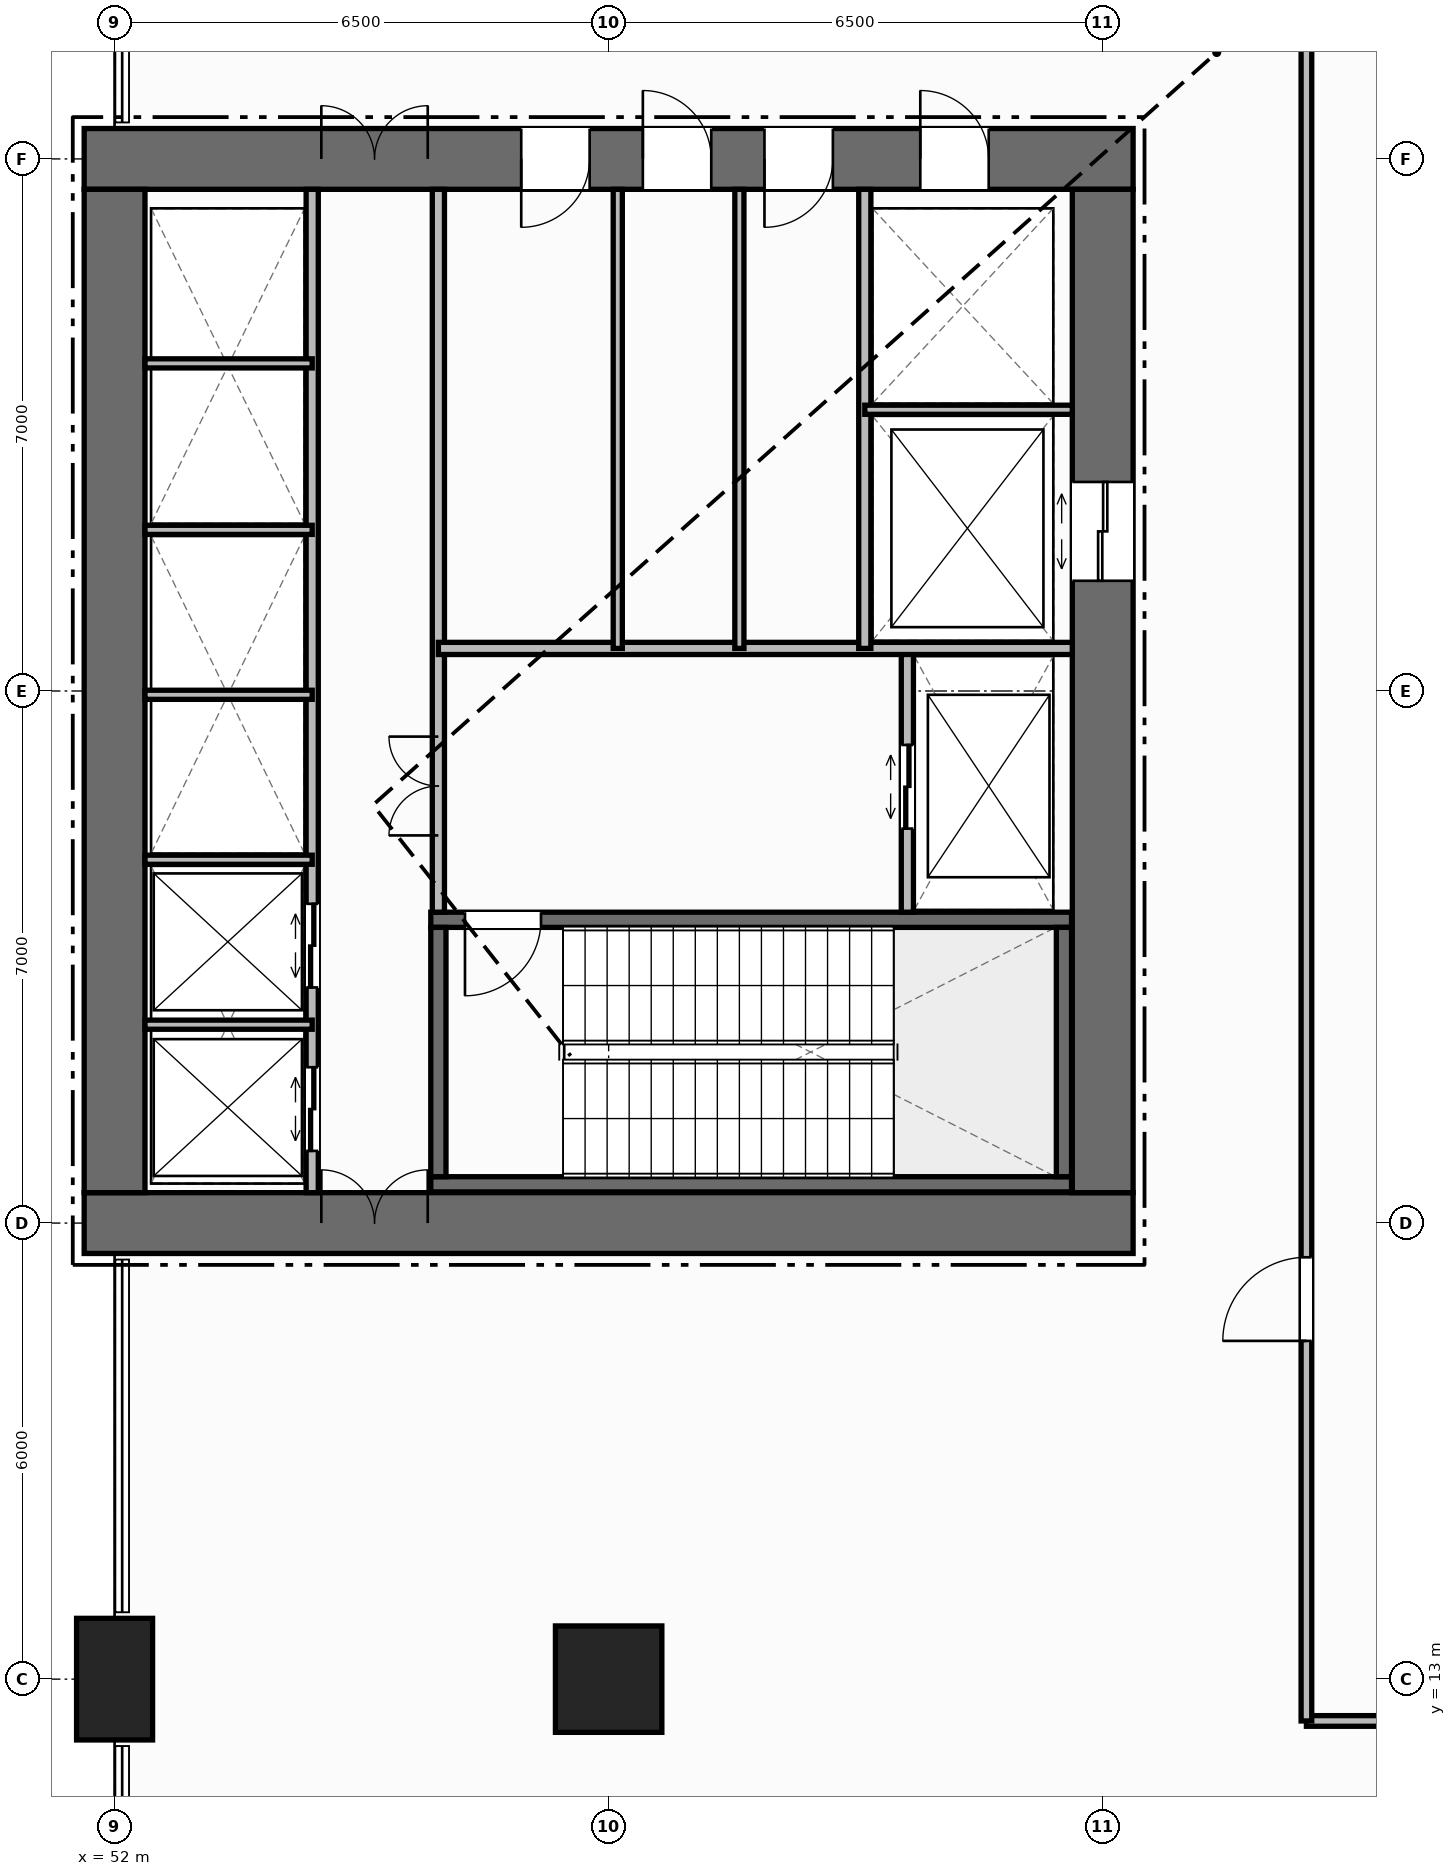
"""IFC4 building model, lengths in metres.
Left out: names, types, materials, properties, quantities, classifications, styles, units other than length and angle.
Written with IfcOpenShell. Run it as: python <this file> out.ifc"""

import sys

from ifc_helpers import new_model, si_unit, direction, frame, frame_2d, origin, origin_2d, place, context, subcontext, project, spatial, rectangle, extrude, element, fill, save


model = new_model("IFC4")
c1 = context("Model", 3, precision=1e-05, world=origin(), true_north=direction((0.0, 1.0)))
c2 = subcontext(c1, "Body", "Model", "MODEL_VIEW")
j1 = project(units=[si_unit("LENGTHUNIT", "METRE"), si_unit("PLANEANGLEUNIT", "RADIAN")], contexts=[c1])
p1 = place(None, origin())
s1 = spatial("IfcSite", under=j1, at=p1, CompositionType="ELEMENT")
p2 = place(p1, origin())
s2 = spatial("IfcBuilding", under=s1, at=p2, CompositionType="ELEMENT")
p3 = place(p2, frame((0.0, 0.0, 11.5)))
s3 = spatial("IfcBuildingStorey", under=s2, at=p3, CompositionType="ELEMENT", Elevation=11.5)
p4 = place(p3, frame((51.6, 19.0, 0.0), z_axis=(0.0, 0.0, 1.0), x_axis=(1.0, 0.0, 0.0)))
e1 = element("IfcWall", 1, at=p4, inside=s3, PredefinedType="SHEAR", context=c2, shape_type="SweptSolid", body=[
    extrude(rectangle(XDim=13.8, YDim=0.8, at=frame_2d((6.9, 0.0))), origin(), (0.0, 0.0, 1.0), 5.5),
])
p5 = place(p4, frame((3.12, 0.0, 0.0)))
e2 = element("IfcOpeningElement", 2, at=p5, cuts=e1, PredefinedType="OPENING", context=c2, shape_type="SweptSolid", body=[
    extrude(rectangle(XDim=1.4, YDim=2.2, at=frame_2d((0.7, 1.1))), frame((0.0, 0.41, 0.0), z_axis=(0.0, -1.0, 0.0), x_axis=(1.0, 0.0, 0.0)), (0.0, 0.0, 1.0), 0.82),
])
p6 = place(p3, frame((51.6, 33.0, 0.0), z_axis=(0.0, 0.0, 1.0), x_axis=(1.0, 0.0, 0.0)))
e3 = element("IfcWall", 3, at=p6, inside=s3, PredefinedType="SHEAR", context=c2, shape_type="SweptSolid", body=[
    extrude(rectangle(XDim=13.8, YDim=0.8, at=frame_2d((6.9, 0.0))), origin(), (0.0, 0.0, 1.0), 5.5),
])
p7 = place(p6, frame((3.12, 0.0, 0.0)))
e4 = element("IfcOpeningElement", 4, at=p7, cuts=e3, PredefinedType="OPENING", context=c2, shape_type="SweptSolid", body=[
    extrude(rectangle(XDim=1.4, YDim=2.2, at=frame_2d((0.7, 1.1))), frame((0.0, 0.41, 0.0), z_axis=(0.0, -1.0, 0.0), x_axis=(1.0, 0.0, 0.0)), (0.0, 0.0, 1.0), 0.82),
])
p8 = place(p6, frame((11.0, 0.0, 0.0)))
e5 = element("IfcOpeningElement", 5, at=p8, cuts=e3, PredefinedType="OPENING", context=c2, shape_type="SweptSolid", body=[
    extrude(rectangle(XDim=0.9, YDim=2.15, at=frame_2d((0.45, 1.075))), frame((0.0, 0.41, 0.0), z_axis=(0.0, -1.0, 0.0), x_axis=(1.0, 0.0, 0.0)), (0.0, 0.0, 1.0), 0.82),
])
p9 = place(p6, frame((5.75, 0.0, 0.0)))
e6 = element("IfcOpeningElement", 6, at=p9, cuts=e3, PredefinedType="OPENING", context=c2, shape_type="SweptSolid", body=[
    extrude(rectangle(XDim=0.9, YDim=2.15, at=frame_2d((0.45, 1.075))), frame((0.0, 0.41, 0.0), z_axis=(0.0, -1.0, 0.0), x_axis=(1.0, 0.0, 0.0)), (0.0, 0.0, 1.0), 0.82),
])
p10 = place(p6, frame((7.35, 0.0, 0.0)))
e7 = element("IfcOpeningElement", 7, at=p10, cuts=e3, PredefinedType="OPENING", context=c2, shape_type="SweptSolid", body=[
    extrude(rectangle(XDim=0.9, YDim=2.15, at=frame_2d((0.45, 1.075))), frame((0.0, 0.41, 0.0), z_axis=(0.0, -1.0, 0.0), x_axis=(1.0, 0.0, 0.0)), (0.0, 0.0, 1.0), 0.82),
])
p11 = place(p6, frame((8.95, 0.0, 0.0)))
e8 = element("IfcOpeningElement", 8, at=p11, cuts=e3, PredefinedType="OPENING", context=c2, shape_type="SweptSolid", body=[
    extrude(rectangle(XDim=0.9, YDim=2.15, at=frame_2d((0.45, 1.075))), frame((0.0, 0.41, 0.0), z_axis=(0.0, -1.0, 0.0), x_axis=(1.0, 0.0, 0.0)), (0.0, 0.0, 1.0), 0.82),
])
p12 = place(p3, frame((52.0, 19.4, 0.0), z_axis=(0.0, 0.0, 1.0), x_axis=(0.0, 1.0, 0.0)))
e9 = element("IfcWall", 9, at=p12, inside=s3, PredefinedType="SHEAR", context=c2, shape_type="SweptSolid", body=[
    extrude(rectangle(XDim=13.2, YDim=0.8, at=frame_2d((6.6, 0.0))), origin(), (0.0, 0.0, 1.0), 5.5),
])
p13 = place(p3, frame((65.0, 19.4, 0.0), z_axis=(0.0, 0.0, 1.0), x_axis=(0.0, 1.0, 0.0)))
e10 = element("IfcWall", 10, at=p13, inside=s3, PredefinedType="SHEAR", context=c2, shape_type="SweptSolid", body=[
    extrude(rectangle(XDim=13.2, YDim=0.8, at=frame_2d((6.6, 0.0))), origin(), (0.0, 0.0, 1.0), 5.5),
])
p14 = place(p13, frame((8.05, 0.0, 0.0)))
e11 = element("IfcOpeningElement", 11, at=p14, cuts=e10, PredefinedType="OPENING", context=c2, shape_type="SweptSolid", body=[
    extrude(rectangle(XDim=1.3, YDim=2.2, at=frame_2d((0.65, 1.1))), frame((0.0, 0.41, 0.0), z_axis=(0.0, -1.0, 0.0), x_axis=(1.0, 0.0, 0.0)), (0.0, 0.0, 1.0), 0.82),
])
p15 = place(p3, frame((56.16, 19.51, 0.0), z_axis=(0.0, 0.0, 1.0), x_axis=(1.0, 0.0, 0.0)))
e12 = element("IfcWall", 12, at=p15, inside=s3, PredefinedType="SHEAR", context=c2, shape_type="SweptSolid", body=[
    extrude(rectangle(XDim=8.43, YDim=0.2, at=frame_2d((4.215, 0.0))), origin(), (0.0, 0.0, 1.0), 5.5),
])
p16 = place(p3, frame((56.16, 22.99, 0.0), z_axis=(0.0, 0.0, 1.0), x_axis=(1.0, 0.0, 0.0)))
e13 = element("IfcWall", 13, at=p16, inside=s3, PredefinedType="SHEAR", context=c2, shape_type="SweptSolid", body=[
    extrude(rectangle(XDim=8.43, YDim=0.2, at=frame_2d((4.215, 0.0))), origin(), (0.0, 0.0, 1.0), 5.5),
])
p17 = place(p16, frame((0.45, 0.0, 0.0)))
e14 = element("IfcOpeningElement", 14, at=p17, cuts=e13, PredefinedType="OPENING", context=c2, shape_type="SweptSolid", body=[
    extrude(rectangle(XDim=1.0, YDim=2.15, at=frame_2d((0.5, 1.075))), frame((0.0, 0.11, 0.0), z_axis=(0.0, -1.0, 0.0), x_axis=(1.0, 0.0, 0.0)), (0.0, 0.0, 1.0), 0.22),
])
for number, where, z_axis, x_axis in (
    (15, (56.26, 19.61, 0.0), (0.0, 0.0, 1.0), (0.0, 1.0, 0.0)),
    (16, (64.49, 19.61, 0.0), (0.0, 0.0, 1.0), (0.0, 1.0, 0.0)),
):
    element("IfcWall", number, at=place(p3, frame(where, z_axis=z_axis, x_axis=x_axis)), inside=s3, PredefinedType="SHEAR", context=c2, shape_type="SweptSolid", body=[
        extrude(rectangle(XDim=3.28, YDim=0.2, at=frame_2d((1.64, 0.0))), origin(), (0.0, 0.0, 1.0), 5.5),
    ])
p18 = place(p3, frame((58.5, 13.0, 0.0), z_axis=(0.0, 0.0, 1.0), x_axis=(1.0, 0.0, 0.0)))
e17 = element("IfcColumn", 17, at=p18, inside=s3, PredefinedType="COLUMN", context=c2, shape_type="SweptSolid", body=[
    extrude(rectangle(XDim=1.4, YDim=1.4, at=origin_2d()), origin(), (0.0, 0.0, 1.0), 5.5),
])
p19 = place(p3, frame((52.0, 13.0, 0.0), z_axis=(0.0, 0.0, 1.0), x_axis=(1.0, 0.0, 0.0)))
e18 = element("IfcColumn", 18, at=p19, inside=s3, PredefinedType="PILASTER", context=c2, shape_type="SweptSolid", body=[
    extrude(rectangle(XDim=1.0, YDim=1.6, at=origin_2d()), origin(), (0.0, 0.0, 1.0), 5.5),
])
p20 = place(p3, frame((54.6, 19.4, 0.0), z_axis=(0.0, 0.0, 1.0), x_axis=(0.0, 1.0, 0.0)))
e19 = element("IfcWall", 19, at=p20, inside=s3, PredefinedType="STANDARD", context=c2, shape_type="SweptSolid", body=[
    extrude(rectangle(XDim=13.2, YDim=0.16, at=frame_2d((6.6, 0.0))), origin(), (0.0, 0.0, 1.0), 5.22),
])
p21 = place(p20, frame((0.55, 0.0, 0.0)))
e20 = element("IfcOpeningElement", 20, at=p21, cuts=e19, PredefinedType="OPENING", context=c2, shape_type="SweptSolid", body=[
    extrude(rectangle(XDim=1.1, YDim=2.2, at=frame_2d((0.55, 1.1))), frame((0.0, 0.09, 0.0), z_axis=(0.0, -1.0, 0.0), x_axis=(1.0, 0.0, 0.0)), (0.0, 0.0, 1.0), 0.18),
])
p22 = place(p20, frame((2.7, 0.0, 0.0)))
e21 = element("IfcOpeningElement", 21, at=p22, cuts=e19, PredefinedType="OPENING", context=c2, shape_type="SweptSolid", body=[
    extrude(rectangle(XDim=1.1, YDim=2.2, at=frame_2d((0.55, 1.1))), frame((0.0, 0.09, 0.0), z_axis=(0.0, -1.0, 0.0), x_axis=(1.0, 0.0, 0.0)), (0.0, 0.0, 1.0), 0.18),
])
p23 = place(p3, frame((56.26, 23.09, 0.0), z_axis=(0.0, 0.0, 1.0), x_axis=(0.0, 1.0, 0.0)))
e22 = element("IfcWall", 22, at=p23, inside=s3, PredefinedType="STANDARD", context=c2, shape_type="SweptSolid", body=[
    extrude(rectangle(XDim=9.51, YDim=0.16, at=frame_2d((4.755, 0.0))), origin(), (0.0, 0.0, 1.0), 5.22),
])
p24 = place(p23, frame((1.01, 0.0, 0.0)))
e23 = element("IfcOpeningElement", 23, at=p24, cuts=e22, PredefinedType="OPENING", context=c2, shape_type="SweptSolid", body=[
    extrude(rectangle(XDim=1.3, YDim=2.2, at=frame_2d((0.65, 1.1))), frame((0.0, 0.09, 0.0), z_axis=(0.0, -1.0, 0.0), x_axis=(1.0, 0.0, 0.0)), (0.0, 0.0, 1.0), 0.18),
])
for number, where, z_axis, x_axis in (
    (24, (52.4, 21.61, 0.0), (0.0, 0.0, 1.0), (1.0, 0.0, 0.0)),
    (25, (52.4, 23.78, 0.0), (0.0, 0.0, 1.0), (1.0, 0.0, 0.0)),
    (26, (52.4, 25.95, 0.0), (0.0, 0.0, 1.0), (1.0, 0.0, 0.0)),
    (27, (52.4, 28.12, 0.0), (0.0, 0.0, 1.0), (1.0, 0.0, 0.0)),
    (28, (52.4, 30.31, 0.0), (0.0, 0.0, 1.0), (1.0, 0.0, 0.0)),
):
    element("IfcWall", number, at=place(p3, frame(where, z_axis=z_axis, x_axis=x_axis)), inside=s3, PredefinedType="PARTITIONING", context=c2, shape_type="SweptSolid", body=[
        extrude(rectangle(XDim=2.2, YDim=0.12, at=frame_2d((1.1, 0.0))), origin(), (0.0, 0.0, 1.0), 5.22),
    ])
p25 = place(p3, frame((62.43, 23.09, 0.0), z_axis=(0.0, 0.0, 1.0), x_axis=(0.0, 1.0, 0.0)))
e29 = element("IfcWall", 29, at=p25, inside=s3, PredefinedType="STANDARD", context=c2, shape_type="SweptSolid", body=[
    extrude(rectangle(XDim=3.47, YDim=0.16, at=frame_2d((1.735, 0.0))), origin(), (0.0, 0.0, 1.0), 5.22),
])
p26 = place(p25, frame((1.1, 0.0, 0.0)))
e30 = element("IfcOpeningElement", 30, at=p26, cuts=e29, PredefinedType="OPENING", context=c2, shape_type="SweptSolid", body=[
    extrude(rectangle(XDim=1.1, YDim=2.2, at=frame_2d((0.55, 1.1))), frame((0.0, 0.09, 0.0), z_axis=(0.0, -1.0, 0.0), x_axis=(1.0, 0.0, 0.0)), (0.0, 0.0, 1.0), 0.18),
])
p27 = place(p3, frame((56.26, 26.56, 0.0), z_axis=(0.0, 0.0, 1.0), x_axis=(1.0, 0.0, 0.0)))
e31 = element("IfcWall", 31, at=p27, inside=s3, PredefinedType="STANDARD", context=c2, shape_type="SweptSolid", body=[
    extrude(rectangle(XDim=8.34, YDim=0.16, at=frame_2d((4.17, 0.0))), origin(), (0.0, 0.0, 1.0), 5.22),
])
p28 = place(p3, frame((61.87, 26.56, 0.0), z_axis=(0.0, 0.0, 1.0), x_axis=(0.0, 1.0, 0.0)))
e32 = element("IfcWall", 32, at=p28, inside=s3, PredefinedType="STANDARD", context=c2, shape_type="SweptSolid", body=[
    extrude(rectangle(XDim=6.04, YDim=0.16, at=frame_2d((3.02, 0.0))), origin(), (0.0, 0.0, 1.0), 5.22),
])
p29 = place(p3, frame((61.87, 29.7, 0.0), z_axis=(0.0, 0.0, 1.0), x_axis=(1.0, 0.0, 0.0)))
e33 = element("IfcWall", 33, at=p29, inside=s3, PredefinedType="PARTITIONING", context=c2, shape_type="SweptSolid", body=[
    extrude(rectangle(XDim=2.73, YDim=0.12, at=frame_2d((1.365, 0.0))), origin(), (0.0, 0.0, 1.0), 5.22),
])
for number, where, z_axis, x_axis in (
    (34, (58.62, 26.56, 0.0), (0.0, 0.0, 1.0), (0.0, 1.0, 0.0)),
    (35, (60.22, 26.56, 0.0), (0.0, 0.0, 1.0), (0.0, 1.0, 0.0)),
):
    element("IfcWall", number, at=place(p3, frame(where, z_axis=z_axis, x_axis=x_axis)), inside=s3, PredefinedType="PARTITIONING", context=c2, shape_type="SweptSolid", body=[
        extrude(rectangle(XDim=6.04, YDim=0.12, at=frame_2d((3.02, 0.0))), origin(), (0.0, 0.0, 1.0), 5.22),
    ])
p30 = place(p3, frame((67.68, 12.45, 0.0), z_axis=(0.0, 0.0, 1.0), x_axis=(1.0, 0.0, 0.0)))
e36 = element("IfcWall", 36, at=p30, inside=s3, PredefinedType="PARTITIONING", context=c2, shape_type="SweptSolid", body=[
    extrude(rectangle(XDim=6.27, YDim=0.14, at=frame_2d((3.135, 0.0))), origin(), (0.0, 0.0, 1.0), 5.22),
])
p31 = place(p3, frame((67.68, 12.45, 0.0), z_axis=(0.0, 0.0, 1.0), x_axis=(0.0, 1.0, 0.0)))
e37 = element("IfcWall", 37, at=p31, inside=s3, PredefinedType="PARTITIONING", context=c2, shape_type="SweptSolid", body=[
    extrude(rectangle(XDim=23.13, YDim=0.14, at=frame_2d((11.565, 0.0))), origin(), (0.0, 0.0, 1.0), 5.22),
])
p32 = place(p31, frame((5.0, 0.0, 0.0)))
e38 = element("IfcOpeningElement", 38, at=p32, cuts=e37, PredefinedType="OPENING", context=c2, shape_type="SweptSolid", body=[
    extrude(rectangle(XDim=1.1, YDim=2.15, at=frame_2d((0.55, 1.075))), frame((0.0, 0.08, 0.0), z_axis=(0.0, -1.0, 0.0), x_axis=(1.0, 0.0, 0.0)), (0.0, 0.0, 1.0), 0.16),
])
p33 = place(p5, origin())
e39 = element("IfcDoor", 39, at=p33, inside=s3, OperationType="DOUBLE_DOOR_SINGLE_SWING", PredefinedType="DOOR", context=c2, shape_type="SweptSolid", body=[
    extrude(rectangle(XDim=1.4, YDim=2.2, at=frame_2d((0.7, 1.1))), frame((0.0, 0.125, 0.0), z_axis=(0.0, -1.0, 0.0), x_axis=(1.0, 0.0, 0.0)), (0.0, 0.0, 1.0), 0.05),
])
fill(e2, e39)
p34 = place(p7, origin())
e40 = element("IfcDoor", 40, at=p34, inside=s3, OperationType="DOUBLE_DOOR_SINGLE_SWING", PredefinedType="DOOR", context=c2, shape_type="SweptSolid", body=[
    extrude(rectangle(XDim=1.4, YDim=2.2, at=frame_2d((0.7, 1.1))), frame((0.0, -0.075, 0.0), z_axis=(0.0, -1.0, 0.0), x_axis=(1.0, 0.0, 0.0)), (0.0, 0.0, 1.0), 0.05),
])
fill(e4, e40)
p35 = place(p21, origin())
e41 = element("IfcDoor", 41, at=p35, inside=s3, OperationType="DOUBLE_DOOR_SLIDING", PredefinedType="DOOR", context=c2, shape_type="SweptSolid", body=[
    extrude(rectangle(XDim=1.1, YDim=2.2, at=frame_2d((0.55, 1.1))), frame((0.0, 0.025, 0.0), z_axis=(0.0, -1.0, 0.0), x_axis=(1.0, 0.0, 0.0)), (0.0, 0.0, 1.0), 0.05),
])
fill(e20, e41)
p36 = place(p22, origin())
e42 = element("IfcDoor", 42, at=p36, inside=s3, OperationType="DOUBLE_DOOR_SLIDING", PredefinedType="DOOR", context=c2, shape_type="SweptSolid", body=[
    extrude(rectangle(XDim=1.1, YDim=2.2, at=frame_2d((0.55, 1.1))), frame((0.0, 0.025, 0.0), z_axis=(0.0, -1.0, 0.0), x_axis=(1.0, 0.0, 0.0)), (0.0, 0.0, 1.0), 0.05),
])
fill(e21, e42)
p37 = place(p17, origin())
e43 = element("IfcDoor", 43, at=p37, inside=s3, OperationType="SINGLE_SWING_RIGHT", PredefinedType="DOOR", context=c2, shape_type="SweptSolid", body=[
    extrude(rectangle(XDim=1.0, YDim=2.15, at=frame_2d((0.5, 1.075))), frame((0.0, 0.025, 0.0), z_axis=(0.0, -1.0, 0.0), x_axis=(1.0, 0.0, 0.0)), (0.0, 0.0, 1.0), 0.05),
])
fill(e14, e43)
p38 = place(p26, origin())
e44 = element("IfcDoor", 44, at=p38, inside=s3, OperationType="DOUBLE_DOOR_SLIDING", PredefinedType="DOOR", context=c2, shape_type="SweptSolid", body=[
    extrude(rectangle(XDim=1.1, YDim=2.2, at=frame_2d((0.55, 1.1))), frame((0.0, 0.025, 0.0), z_axis=(0.0, -1.0, 0.0), x_axis=(1.0, 0.0, 0.0)), (0.0, 0.0, 1.0), 0.05),
])
fill(e30, e44)
p39 = place(p24, origin())
e45 = element("IfcDoor", 45, at=p39, inside=s3, OperationType="DOUBLE_DOOR_SINGLE_SWING", PredefinedType="DOOR", context=c2, shape_type="SweptSolid", body=[
    extrude(rectangle(XDim=1.3, YDim=2.2, at=frame_2d((0.65, 1.1))), frame((0.0, 0.025, 0.0), z_axis=(0.0, -1.0, 0.0), x_axis=(1.0, 0.0, 0.0)), (0.0, 0.0, 1.0), 0.05),
])
fill(e23, e45)
p40 = place(p14, origin())
e46 = element("IfcDoor", 46, at=p40, inside=s3, OperationType="DOUBLE_DOOR_SLIDING", PredefinedType="DOOR", context=c2, shape_type="SweptSolid", body=[
    extrude(rectangle(XDim=1.3, YDim=2.2, at=frame_2d((0.65, 1.1))), frame((0.0, 0.025, 0.0), z_axis=(0.0, -1.0, 0.0), x_axis=(1.0, 0.0, 0.0)), (0.0, 0.0, 1.0), 0.05),
])
fill(e11, e46)
p41 = place(p8, origin())
e47 = element("IfcDoor", 47, at=p41, inside=s3, OperationType="SINGLE_SWING_LEFT", PredefinedType="DOOR", context=c2, shape_type="SweptSolid", body=[
    extrude(rectangle(XDim=0.9, YDim=2.15, at=frame_2d((0.45, 1.075))), frame((0.0, -0.075, 0.0), z_axis=(0.0, -1.0, 0.0), x_axis=(1.0, 0.0, 0.0)), (0.0, 0.0, 1.0), 0.05),
])
fill(e5, e47)
p42 = place(p9, origin())
e48 = element("IfcDoor", 48, at=p42, inside=s3, OperationType="SINGLE_SWING_RIGHT", PredefinedType="DOOR", context=c2, shape_type="SweptSolid", body=[
    extrude(rectangle(XDim=0.9, YDim=2.15, at=frame_2d((0.45, 1.075))), frame((0.0, -0.075, 0.0), z_axis=(0.0, -1.0, 0.0), x_axis=(1.0, 0.0, 0.0)), (0.0, 0.0, 1.0), 0.05),
])
fill(e6, e48)
p43 = place(p10, origin())
e49 = element("IfcDoor", 49, at=p43, inside=s3, OperationType="SINGLE_SWING_LEFT", PredefinedType="DOOR", context=c2, shape_type="SweptSolid", body=[
    extrude(rectangle(XDim=0.9, YDim=2.15, at=frame_2d((0.45, 1.075))), frame((0.0, -0.075, 0.0), z_axis=(0.0, -1.0, 0.0), x_axis=(1.0, 0.0, 0.0)), (0.0, 0.0, 1.0), 0.05),
])
fill(e7, e49)
p44 = place(p11, origin())
e50 = element("IfcDoor", 50, at=p44, inside=s3, OperationType="SINGLE_SWING_RIGHT", PredefinedType="DOOR", context=c2, shape_type="SweptSolid", body=[
    extrude(rectangle(XDim=0.9, YDim=2.15, at=frame_2d((0.45, 1.075))), frame((0.0, -0.075, 0.0), z_axis=(0.0, -1.0, 0.0), x_axis=(1.0, 0.0, 0.0)), (0.0, 0.0, 1.0), 0.05),
])
fill(e8, e50)
p45 = place(p32, origin())
e51 = element("IfcDoor", 51, at=p45, inside=s3, OperationType="SINGLE_SWING_LEFT", PredefinedType="DOOR", context=c2, shape_type="SweptSolid", body=[
    extrude(rectangle(XDim=1.1, YDim=2.15, at=frame_2d((0.55, 1.075))), frame((0.0, 0.025, 0.0), z_axis=(0.0, -1.0, 0.0), x_axis=(1.0, 0.0, 0.0)), (0.0, 0.0, 1.0), 0.05),
])
fill(e38, e51)
save(model, sys.argv[1])
